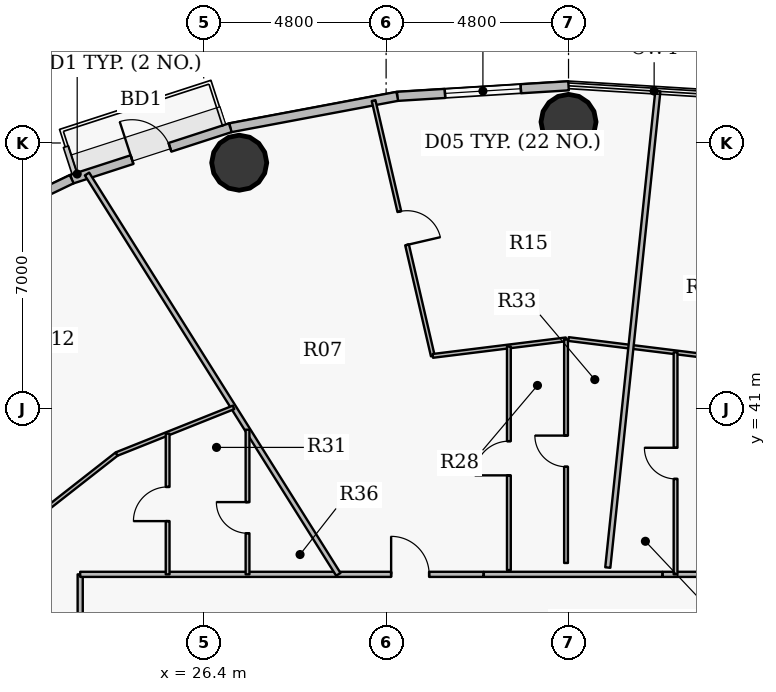
"""IFC4 building model, lengths in metres.
Left out: names, types, materials, properties, quantities, classifications, styles, units other than length and angle.
Written with IfcOpenShell. Run it as: python <this file> out.ifc"""

import sys

from ifc_helpers import new_model, si_unit, direction, frame, frame_2d, origin, origin_2d, place, context, subcontext, project, spatial, rectangle, hollow_circle, extrude, source, transform, mapped, element, fill, save


model = new_model("IFC4")
c1 = context("Model", 3, precision=1e-05, world=origin(), true_north=direction((0.0, 1.0)))
c2 = subcontext(c1, "Body", "Model", "MODEL_VIEW")
j1 = project(units=[si_unit("LENGTHUNIT", "METRE"), si_unit("PLANEANGLEUNIT", "RADIAN")], contexts=[c1])
p1 = place(None, origin())
s1 = spatial("IfcSite", under=j1, at=p1, CompositionType="ELEMENT")
p2 = place(p1, origin())
s2 = spatial("IfcBuilding", under=s1, at=p2, CompositionType="ELEMENT")
p3 = place(p2, frame((0.0, 0.0, 119.7)))
s3 = spatial("IfcBuildingStorey", under=s2, at=p3, CompositionType="ELEMENT", Elevation=119.7)
for number, where, z_axis, x_axis in (
    (1, (36.0, 48.555, 0.0), (0.0, 0.0, 1.0), (1.0, 0.0, 0.0)),
    (2, (27.334, 47.481, 0.0), (0.0, 0.0, 1.0), (1.0, 0.0, 0.0)),
):
    element("IfcColumn", number, at=place(p3, frame(where, z_axis=z_axis, x_axis=x_axis)), inside=s3, PredefinedType="COLUMN", context=c2, shape_type="SweptSolid", body=[
        extrude(hollow_circle(Radius=0.725, WallThickness=0.042, at=origin_2d()), origin(), (0.0, 0.0, 1.0), 3.75),
    ])
p4 = place(p3, frame((31.494, 49.227, 0.0), z_axis=(0.0, 0.0, 1.0), x_axis=(0.998107531589, 0.061492726276, 0.0)))
e3 = element("IfcWall", 3, at=p4, inside=s3, PredefinedType="SOLIDWALL", context=c2, shape_type="SweptSolid", body=[
    extrude(rectangle(XDim=4.514, YDim=0.24, at=frame_2d((2.257, 0.0))), origin(), (0.0, 0.0, 1.0), 3.5),
])
p5 = place(p4, frame((1.257, 0.0, 0.9)))
e4 = element("IfcOpeningElement", 4, at=p5, cuts=e3, PredefinedType="OPENING", context=c2, shape_type="SweptSolid", body=[
    extrude(rectangle(XDim=2.0, YDim=1.75, at=origin_2d()), frame((1.0, 0.13, 0.875), z_axis=(0.0, -1.0, 0.0), x_axis=(1.0, 0.0, 0.0)), (0.0, 0.0, 1.0), 0.26),
])
p6 = place(p3, frame((27.1, 48.401, 0.0), z_axis=(0.0, 0.0, 1.0), x_axis=(0.982789252177, 0.184730305596, 0.0)))
e5 = element("IfcWall", 5, at=p6, inside=s3, PredefinedType="SOLIDWALL", context=c2, shape_type="SweptSolid", body=[
    extrude(rectangle(XDim=4.471, YDim=0.24, at=frame_2d((2.235, 0.0))), origin(), (0.0, 0.0, 1.0), 3.5),
])
p7 = place(p3, frame((22.926, 47.047, 0.0), z_axis=(0.0, 0.0, 1.0), x_axis=(0.951211346073, 0.308540070495, 0.0)))
e6 = element("IfcWall", 6, at=p7, inside=s3, PredefinedType="SOLIDWALL", context=c2, shape_type="SweptSolid", body=[
    extrude(rectangle(XDim=4.388, YDim=0.24, at=frame_2d((2.194, 0.0))), origin(), (0.0, 0.0, 1.0), 3.5),
])
p8 = place(p7, frame((1.669, 0.0, 0.0)))
e7 = element("IfcOpeningElement", 7, at=p8, cuts=e6, PredefinedType="OPENING", context=c2, shape_type="SweptSolid", body=[
    extrude(rectangle(XDim=1.05, YDim=2.15, at=origin_2d()), frame((0.525, 0.13, 1.075), z_axis=(0.0, -1.0, 0.0), x_axis=(1.0, 0.0, 0.0)), (0.0, 0.0, 1.0), 0.26),
])
p9 = place(p3, frame((19.075, 45.199, 0.0), z_axis=(0.0, 0.0, 1.0), x_axis=(0.901589935876, 0.432591709962, 0.0)))
e8 = element("IfcWall", 8, at=p9, inside=s3, PredefinedType="SOLIDWALL", context=c2, shape_type="SweptSolid", body=[
    extrude(rectangle(XDim=4.272, YDim=0.24, at=frame_2d((2.136, 0.0))), origin(), (0.0, 0.0, 1.0), 3.5),
])
p10 = place(p9, frame((1.136, 0.0, 0.9)))
e9 = element("IfcOpeningElement", 9, at=p10, cuts=e8, PredefinedType="OPENING", context=c2, shape_type="SweptSolid", body=[
    extrude(rectangle(XDim=2.0, YDim=1.75, at=origin_2d()), frame((1.0, 0.13, 0.875), z_axis=(0.0, -1.0, 0.0), x_axis=(1.0, 0.0, 0.0)), (0.0, 0.0, 1.0), 0.26),
])
p11 = place(p3, frame((9.91, 36.375, 0.0), z_axis=(0.0, 0.0, 1.0), x_axis=(0.941089213164, -0.338158384292, 0.0)))
e10 = element("IfcWall", 10, at=p11, inside=s3, PredefinedType="PARTITIONING", context=c2, shape_type="SweptSolid", body=[
    extrude(rectangle(XDim=14.069, YDim=0.135, at=frame_2d((7.035, 0.0))), origin(), (0.0, 0.0, 1.0), 2.935),
])
p12 = place(p3, frame((22.064, 38.214, 0.0), z_axis=(0.0, 0.0, 1.0), x_axis=(0.787364158956, 0.616488184146, 0.0)))
e11 = element("IfcWall", 11, at=p12, inside=s3, PredefinedType="PARTITIONING", context=c2, shape_type="SweptSolid", body=[
    extrude(rectangle(XDim=2.597, YDim=0.1, at=frame_2d((1.299, 0.0))), origin(), (0.0, 0.0, 1.0), 3.5),
])
p13 = place(p3, frame((23.15, 17.35, 0.0), z_axis=(0.0, 0.0, 1.0), x_axis=(0.0, 1.0, 0.0)))
e12 = element("IfcWall", 12, at=p13, inside=s3, PredefinedType="PARTITIONING", context=c2, shape_type="SweptSolid", body=[
    extrude(rectangle(XDim=19.3, YDim=0.135, at=frame_2d((9.65, 0.0))), origin(), (0.0, 0.0, 1.0), 2.935),
])
p14 = place(p13, frame((16.264, 0.0, 0.0)))
e13 = element("IfcOpeningElement", 13, at=p14, cuts=e12, PredefinedType="OPENING", context=c2, shape_type="SweptSolid", body=[
    extrude(rectangle(XDim=1.0, YDim=2.15, at=origin_2d()), frame((0.5, 0.078, 1.075), z_axis=(0.0, -1.0, 0.0), x_axis=(1.0, 0.0, 0.0)), (0.0, 0.0, 1.0), 0.155),
])
p15 = place(p13, frame((7.426, 0.0, 0.0)))
e14 = element("IfcOpeningElement", 14, at=p15, cuts=e12, PredefinedType="OPENING", context=c2, shape_type="SweptSolid", body=[
    extrude(rectangle(XDim=1.0, YDim=2.15, at=origin_2d()), frame((0.5, 0.078, 1.075), z_axis=(0.0, -1.0, 0.0), x_axis=(1.0, 0.0, 0.0)), (0.0, 0.0, 1.0), 0.155),
])
p16 = place(p3, frame((23.15, 36.65, 0.0), z_axis=(0.0, 0.0, 1.0), x_axis=(1.0, 0.0, 0.0)))
e15 = element("IfcWall", 15, at=p16, inside=s3, PredefinedType="PARTITIONING", context=c2, shape_type="SweptSolid", body=[
    extrude(rectangle(XDim=10.612, YDim=0.135, at=frame_2d((5.306, 0.0))), origin(), (0.0, 0.0, 1.0), 2.935),
])
p17 = place(p16, frame((8.182, 0.0, 0.0)))
e16 = element("IfcOpeningElement", 16, at=p17, cuts=e15, PredefinedType="OPENING", context=c2, shape_type="SweptSolid", body=[
    extrude(rectangle(XDim=1.0, YDim=2.15, at=origin_2d()), frame((0.5, 0.078, 1.075), z_axis=(0.0, -1.0, 0.0), x_axis=(1.0, 0.0, 0.0)), (0.0, 0.0, 1.0), 0.155),
])
p18 = place(p3, frame((23.33, 47.184, 0.0), z_axis=(0.0, 0.0, 1.0), x_axis=(0.531660079213, -0.846957826678, 0.0)))
e17 = element("IfcWall", 17, at=p18, inside=s3, PredefinedType="PARTITIONING", context=c2, shape_type="SweptSolid", body=[
    extrude(rectangle(XDim=12.437, YDim=0.135, at=frame_2d((6.219, 0.0))), origin(), (0.0, 0.0, 1.0), 2.935),
])
p19 = place(p3, frame((24.109, 39.816, 0.0), z_axis=(0.0, 0.0, 1.0), x_axis=(0.928811896505, 0.370551563092, 0.0)))
e18 = element("IfcWall", 18, at=p19, inside=s3, PredefinedType="PARTITIONING", context=c2, shape_type="SweptSolid", body=[
    extrude(rectangle(XDim=3.312, YDim=0.1, at=frame_2d((1.656, 0.0))), origin(), (0.0, 0.0, 1.0), 3.5),
])
p20 = place(p3, frame((25.451, 36.65, 0.0), z_axis=(0.0, 0.0, 1.0), x_axis=(0.0, 1.0, 0.0)))
e19 = element("IfcWall", 19, at=p20, inside=s3, PredefinedType="PARTITIONING", context=c2, shape_type="SweptSolid", body=[
    extrude(rectangle(XDim=3.701, YDim=0.1, at=frame_2d((1.851, 0.0))), origin(), (0.0, 0.0, 1.0), 3.5),
])
p21 = place(p20, frame((1.4, 0.0, 0.0)))
e20 = element("IfcOpeningElement", 20, at=p21, cuts=e19, PredefinedType="OPENING", context=c2, shape_type="SweptSolid", body=[
    extrude(rectangle(XDim=0.9, YDim=2.1, at=origin_2d()), frame((0.45, 0.06, 1.05), z_axis=(0.0, -1.0, 0.0), x_axis=(1.0, 0.0, 0.0)), (0.0, 0.0, 1.0), 0.12),
])
p22 = place(p3, frame((27.553, 36.65, 0.0), z_axis=(0.0, 0.0, 1.0), x_axis=(0.0, 1.0, 0.0)))
e21 = element("IfcWall", 21, at=p22, inside=s3, PredefinedType="PARTITIONING", context=c2, shape_type="SweptSolid", body=[
    extrude(rectangle(XDim=3.806, YDim=0.1, at=frame_2d((1.903, 0.0))), origin(), (0.0, 0.0, 1.0), 3.5),
])
p23 = place(p22, frame((1.081, 0.0, 0.0)))
e22 = element("IfcOpeningElement", 22, at=p23, cuts=e21, PredefinedType="OPENING", context=c2, shape_type="SweptSolid", body=[
    extrude(rectangle(XDim=0.82, YDim=2.1, at=origin_2d()), frame((0.41, 0.06, 1.05), z_axis=(0.0, -1.0, 0.0), x_axis=(1.0, 0.0, 0.0)), (0.0, 0.0, 1.0), 0.12),
])
p24 = place(p3, frame((30.87, 49.115, 0.0), z_axis=(0.0, 0.0, 1.0), x_axis=(0.225963524246, -0.97413576349, 0.0)))
e23 = element("IfcWall", 23, at=p24, inside=s3, PredefinedType="PARTITIONING", context=c2, shape_type="SweptSolid", body=[
    extrude(rectangle(XDim=6.895, YDim=0.1, at=frame_2d((3.448, 0.0))), origin(), (0.0, 0.0, 1.0), 2.935),
])
p25 = place(p24, frame((2.998, 0.0, 0.0)))
e24 = element("IfcOpeningElement", 24, at=p25, cuts=e23, PredefinedType="OPENING", context=c2, shape_type="SweptSolid", body=[
    extrude(rectangle(XDim=0.9, YDim=2.1, at=origin_2d()), frame((0.45, 0.06, 1.05), z_axis=(0.0, -1.0, 0.0), x_axis=(1.0, 0.0, 0.0)), (0.0, 0.0, 1.0), 0.12),
])
p26 = place(p3, frame((32.428, 42.398, 0.0), z_axis=(0.0, 0.0, 1.0), x_axis=(0.992389102891, 0.123141660146, 0.0)))
e25 = element("IfcWall", 25, at=p26, inside=s3, PredefinedType="PARTITIONING", context=c2, shape_type="SweptSolid", body=[
    extrude(rectangle(XDim=3.533, YDim=0.1, at=frame_2d((1.767, 0.0))), origin(), (0.0, 0.0, 1.0), 2.935),
])
p27 = place(p3, frame((34.43, 36.762, 0.0), z_axis=(0.0, 0.0, 1.0), x_axis=(0.0, 1.0, 0.0)))
e26 = element("IfcWall", 26, at=p27, inside=s3, PredefinedType="PARTITIONING", context=c2, shape_type="SweptSolid", body=[
    extrude(rectangle(XDim=5.884, YDim=0.1, at=frame_2d((2.942, 0.0))), origin(), (0.0, 0.0, 1.0), 3.035),
])
p28 = place(p27, frame((2.492, 0.0, 0.0)))
e27 = element("IfcOpeningElement", 27, at=p28, cuts=e26, PredefinedType="OPENING", context=c2, shape_type="SweptSolid", body=[
    extrude(rectangle(XDim=0.9, YDim=2.1, at=origin_2d()), frame((0.45, 0.06, 1.05), z_axis=(0.0, -1.0, 0.0), x_axis=(1.0, 0.0, 0.0)), (0.0, 0.0, 1.0), 0.12),
])
p29 = place(p3, frame((35.935, 36.949, 0.0), z_axis=(0.0, 0.0, 1.0), x_axis=(0.0, 1.0, 0.0)))
e28 = element("IfcWall", 28, at=p29, inside=s3, PredefinedType="PARTITIONING", context=c2, shape_type="SweptSolid", body=[
    extrude(rectangle(XDim=5.884, YDim=0.1, at=frame_2d((2.942, 0.0))), origin(), (0.0, 0.0, 1.0), 2.935),
])
p30 = place(p29, frame((2.532, 0.0, 0.0)))
e29 = element("IfcOpeningElement", 29, at=p30, cuts=e28, PredefinedType="OPENING", context=c2, shape_type="SweptSolid", body=[
    extrude(rectangle(XDim=0.82, YDim=2.1, at=origin_2d()), frame((0.41, 0.06, 1.05), z_axis=(0.0, -1.0, 0.0), x_axis=(1.0, 0.0, 0.0)), (0.0, 0.0, 1.0), 0.12),
])
p31 = place(p3, frame((36.0, 42.841, 0.0), z_axis=(0.0, 0.0, 1.0), x_axis=(0.992395485088, -0.123090215599, 0.0)))
e30 = element("IfcWall", 30, at=p31, inside=s3, PredefinedType="PARTITIONING", context=c2, shape_type="SweptSolid", body=[
    extrude(rectangle(XDim=6.299, YDim=0.1, at=frame_2d((3.15, 0.0))), origin(), (0.0, 0.0, 1.0), 2.935),
])
p32 = place(p3, frame((37.033, 36.829, 0.0), z_axis=(0.0, 0.0, 1.0), x_axis=(0.104530526966, 0.994521678463, 0.0)))
e31 = element("IfcWall", 31, at=p32, inside=s3, PredefinedType="PARTITIONING", context=c2, shape_type="SweptSolid", body=[
    extrude(rectangle(XDim=12.605, YDim=0.135, at=frame_2d((6.303, 0.0))), origin(), (0.0, 0.0, 1.0), 2.935),
])
p33 = place(p3, frame((38.477, 36.65, 0.0), z_axis=(0.0, 0.0, 1.0), x_axis=(1.0, 0.0, 0.0)))
e32 = element("IfcWall", 32, at=p33, inside=s3, PredefinedType="PARTITIONING", context=c2, shape_type="SweptSolid", body=[
    extrude(rectangle(XDim=10.373, YDim=0.135, at=frame_2d((5.187, 0.0))), origin(), (0.0, 0.0, 1.0), 2.935),
])
p34 = place(p33, frame((5.621, 0.0, 0.0)))
e33 = element("IfcOpeningElement", 33, at=p34, cuts=e32, PredefinedType="OPENING", context=c2, shape_type="SweptSolid", body=[
    extrude(rectangle(XDim=1.0, YDim=2.15, at=origin_2d()), frame((0.5, 0.078, 1.075), z_axis=(0.0, -1.0, 0.0), x_axis=(1.0, 0.0, 0.0)), (0.0, 0.0, 1.0), 0.155),
])
p35 = place(p3, frame((38.817, 36.65, 0.0), z_axis=(0.0, 0.0, 1.0), x_axis=(0.0, 1.0, 0.0)))
e34 = element("IfcWall", 34, at=p35, inside=s3, PredefinedType="PARTITIONING", context=c2, shape_type="SweptSolid", body=[
    extrude(rectangle(XDim=5.842, YDim=0.1, at=frame_2d((2.921, 0.0))), origin(), (0.0, 0.0, 1.0), 3.5),
])
p36 = place(p35, frame((2.511, 0.0, 0.0)))
e35 = element("IfcOpeningElement", 35, at=p36, cuts=e34, PredefinedType="OPENING", context=c2, shape_type="SweptSolid", body=[
    extrude(rectangle(XDim=0.82, YDim=2.1, at=origin_2d()), frame((0.41, 0.06, 1.05), z_axis=(0.0, -1.0, 0.0), x_axis=(1.0, 0.0, 0.0)), (0.0, 0.0, 1.0), 0.12),
])
p37 = place(p3, frame((33.772, 36.65, 0.0), z_axis=(0.0, 0.0, 1.0), x_axis=(1.0, 0.0, 0.0)))
e36 = element("IfcWall", 36, at=p37, inside=s3, PredefinedType="PARTITIONING", context=c2, shape_type="SweptSolid", body=[
    extrude(rectangle(XDim=4.695, YDim=0.135, at=frame_2d((2.348, 0.0))), origin(), (0.0, 0.0, 1.0), 2.935),
])
m1 = source(origin(), c2, "Body", "SweptSolid", [
    extrude(rectangle(XDim=2.0, YDim=1.75, at=origin_2d()), frame((1.0, 0.03, 0.875), z_axis=(0.0, -1.0, 0.0), x_axis=(1.0, 0.0, 0.0)), (0.0, 0.0, 1.0), 0.06),
])
p38 = place(p5, origin())
e37 = element("IfcWindow", 37, at=p38, inside=s3, PartitioningType="DOUBLE_PANEL_VERTICAL", PredefinedType="WINDOW", context=c2, shape_type="MappedRepresentation", body=[
    mapped(m1, transform((0.0, 0.0, 0.0), x_axis=(1.0, 0.0, 0.0), y_axis=(0.0, 1.0, 0.0), z_axis=(0.0, 0.0, 1.0), scale=1.0)),
])
fill(e4, e37)
m2 = source(origin(), c2, "Body", "SweptSolid", [
    extrude(rectangle(XDim=1.05, YDim=2.15, at=origin_2d()), frame((0.525, 0.025, 1.075), z_axis=(0.0, -1.0, 0.0), x_axis=(1.0, 0.0, 0.0)), (0.0, 0.0, 1.0), 0.05),
])
p39 = place(p8, origin())
e38 = element("IfcDoor", 38, at=p39, inside=s3, OperationType="SINGLE_SWING_LEFT", PredefinedType="DOOR", context=c2, shape_type="MappedRepresentation", body=[
    mapped(m2, transform((0.0, 0.0, 0.0), x_axis=(1.0, 0.0, 0.0), y_axis=(0.0, 1.0, 0.0), z_axis=(0.0, 0.0, 1.0), scale=1.0)),
])
fill(e7, e38)
m3 = source(origin(), c2, "Body", "SweptSolid", [
    extrude(rectangle(XDim=1.0, YDim=2.15, at=origin_2d()), frame((0.5, 0.025, 1.075), z_axis=(0.0, -1.0, 0.0), x_axis=(1.0, 0.0, 0.0)), (0.0, 0.0, 1.0), 0.05),
])
p40 = place(p17, origin())
e39 = element("IfcDoor", 39, at=p40, inside=s3, OperationType="SINGLE_SWING_LEFT", PredefinedType="DOOR", context=c2, shape_type="MappedRepresentation", body=[
    mapped(m3, transform((0.0, 0.0, 0.0), x_axis=(1.0, 0.0, 0.0), y_axis=(0.0, 1.0, 0.0), z_axis=(0.0, 0.0, 1.0), scale=1.0)),
])
fill(e16, e39)
m4 = source(origin(), c2, "Body", "SweptSolid", [
    extrude(rectangle(XDim=0.9, YDim=2.1, at=origin_2d()), frame((0.45, 0.025, 1.05), z_axis=(0.0, -1.0, 0.0), x_axis=(1.0, 0.0, 0.0)), (0.0, 0.0, 1.0), 0.05),
])
p41 = place(p25, origin())
e40 = element("IfcDoor", 40, at=p41, inside=s3, OperationType="SINGLE_SWING_RIGHT", PredefinedType="DOOR", context=c2, shape_type="MappedRepresentation", body=[
    mapped(m4, transform((0.0, 0.0, 0.0), x_axis=(1.0, 0.0, 0.0), y_axis=(0.0, 1.0, 0.0), z_axis=(0.0, 0.0, 1.0), scale=1.0)),
])
fill(e24, e40)
p42 = place(p28, origin())
e41 = element("IfcDoor", 41, at=p42, inside=s3, OperationType="SINGLE_SWING_LEFT", PredefinedType="DOOR", context=c2, shape_type="MappedRepresentation", body=[
    mapped(m4, transform((0.0, 0.0, 0.0), x_axis=(1.0, 0.0, 0.0), y_axis=(0.0, 1.0, 0.0), z_axis=(0.0, 0.0, 1.0), scale=1.0)),
])
fill(e27, e41)
m5 = source(origin(), c2, "Body", "SweptSolid", [
    extrude(rectangle(XDim=0.82, YDim=2.1, at=origin_2d()), frame((0.41, 0.025, 1.05), z_axis=(0.0, -1.0, 0.0), x_axis=(1.0, 0.0, 0.0)), (0.0, 0.0, 1.0), 0.05),
])
p43 = place(p30, origin())
e42 = element("IfcDoor", 42, at=p43, inside=s3, OperationType="SINGLE_SWING_RIGHT", PredefinedType="DOOR", context=c2, shape_type="MappedRepresentation", body=[
    mapped(m5, transform((0.0, 0.0, 0.0), x_axis=(1.0, 0.0, 0.0), y_axis=(0.0, 1.0, 0.0), z_axis=(0.0, 0.0, 1.0), scale=1.0)),
])
fill(e29, e42)
p44 = place(p21, origin())
e43 = element("IfcDoor", 43, at=p44, inside=s3, OperationType="SINGLE_SWING_LEFT", PredefinedType="DOOR", context=c2, shape_type="MappedRepresentation", body=[
    mapped(m4, transform((0.0, 0.0, 0.0), x_axis=(1.0, 0.0, 0.0), y_axis=(0.0, 1.0, 0.0), z_axis=(0.0, 0.0, 1.0), scale=1.0)),
])
fill(e20, e43)
p45 = place(p23, origin())
e44 = element("IfcDoor", 44, at=p45, inside=s3, OperationType="SINGLE_SWING_RIGHT", PredefinedType="DOOR", context=c2, shape_type="MappedRepresentation", body=[
    mapped(m5, transform((0.0, 0.0, 0.0), x_axis=(1.0, 0.0, 0.0), y_axis=(0.0, 1.0, 0.0), z_axis=(0.0, 0.0, 1.0), scale=1.0)),
])
fill(e22, e44)
p46 = place(p36, origin())
e45 = element("IfcDoor", 45, at=p46, inside=s3, OperationType="SINGLE_SWING_RIGHT", PredefinedType="DOOR", context=c2, shape_type="MappedRepresentation", body=[
    mapped(m5, transform((0.0, 0.0, 0.0), x_axis=(1.0, 0.0, 0.0), y_axis=(0.0, 1.0, 0.0), z_axis=(0.0, 0.0, 1.0), scale=1.0)),
])
fill(e35, e45)
save(model, sys.argv[1])
